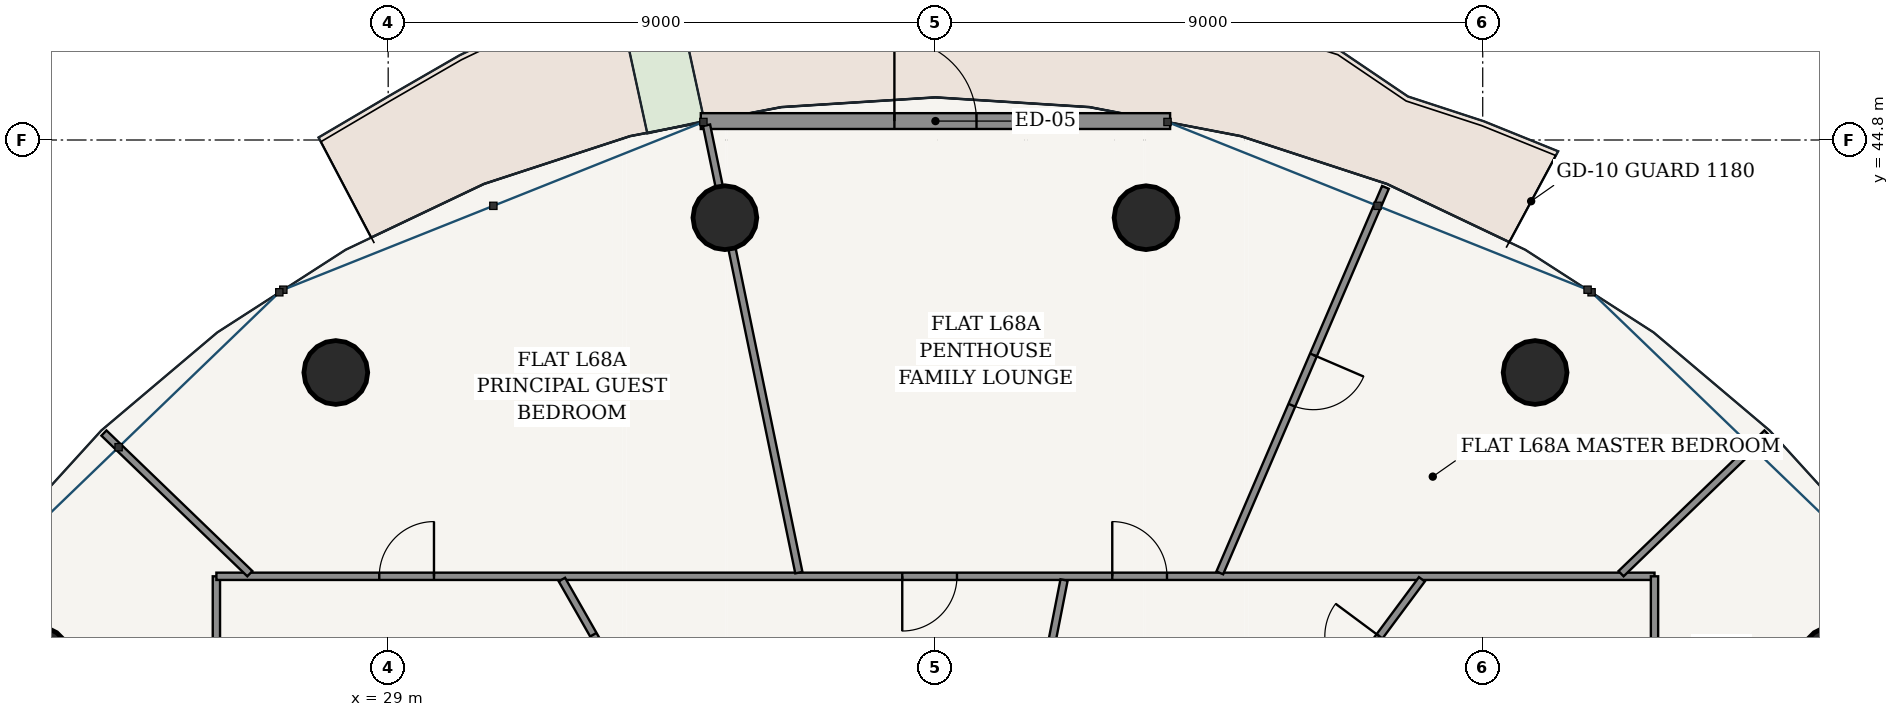
"""IFC4 building model, lengths in metres.
Left out: names, types, materials, properties, quantities, classifications, styles, units other than length and angle.
Written with IfcOpenShell. Run it as: python <this file> out.ifc"""

import sys

from ifc_helpers import new_model, si_unit, direction, frame, frame_2d, origin, origin_2d, place, context, subcontext, project, spatial, rectangle, hollow_circle, extrude, source, transform, mapped, element, fill, save


model = new_model("IFC4")
c1 = context("Model", 3, precision=1e-05, world=origin(), true_north=direction((-0.2419218956, 0.970295726276)))
c2 = subcontext(c1, "Body", "Model", "MODEL_VIEW")
j1 = project(units=[si_unit("LENGTHUNIT", "METRE"), si_unit("PLANEANGLEUNIT", "RADIAN")], contexts=[c1])
p1 = place(None, origin())
s1 = spatial("IfcSite", under=j1, at=p1, CompositionType="ELEMENT")
p2 = place(p1, origin())
s2 = spatial("IfcBuilding", under=s1, at=p2, CompositionType="ELEMENT")
p3 = place(p2, frame((0.0, 0.0, 259.45)))
s3 = spatial("IfcBuildingStorey", under=s2, at=p3, CompositionType="ELEMENT", Elevation=259.45)
for number, where, z_axis, x_axis in (
    (1, (52.759, 36.272, 0.0), (0.0, 0.0, 1.0), (1.0, 0.0, 0.0)),
    (2, (47.861, 40.977, 0.0), (0.0, 0.0, 1.0), (1.0, 0.0, 0.0)),
    (3, (41.463, 43.522, 0.0), (0.0, 0.0, 1.0), (1.0, 0.0, 0.0)),
    (4, (34.537, 43.522, 0.0), (0.0, 0.0, 1.0), (1.0, 0.0, 0.0)),
    (5, (28.139, 40.977, 0.0), (0.0, 0.0, 1.0), (1.0, 0.0, 0.0)),
    (6, (23.241, 36.272, 0.0), (0.0, 0.0, 1.0), (1.0, 0.0, 0.0)),
):
    element("IfcColumn", number, at=place(p3, frame(where, z_axis=z_axis, x_axis=x_axis)), inside=s3, PredefinedType="COLUMN", context=c2, shape_type="SweptSolid", body=[
        extrude(hollow_circle(Radius=0.525, WallThickness=0.035, at=origin_2d()), origin(), (0.0, 0.0, 1.0), 3.75),
    ])
p4 = place(p3, frame((41.859, 45.111, 0.0), z_axis=(0.0, 0.0, 1.0), x_axis=(-1.0, 0.0, 0.0)))
e7 = element("IfcWall", 7, at=p4, inside=s3, PredefinedType="SOLIDWALL", context=c2, shape_type="SweptSolid", body=[
    extrude(rectangle(XDim=7.718, YDim=0.26, at=frame_2d((3.859, 0.0))), origin(), (0.0, 0.0, 1.0), 3.49),
])
p5 = place(p4, frame((3.184, 0.0, 0.0)))
e8 = element("IfcOpeningElement", 8, at=p5, cuts=e7, PredefinedType="OPENING", context=c2, shape_type="SweptSolid", body=[
    extrude(rectangle(XDim=1.35, YDim=2.2, at=frame_2d((0.675, 1.1))), frame((0.0, 0.14, 0.0), z_axis=(0.0, -1.0, 0.0), x_axis=(1.0, 0.0, 0.0)), (0.0, 0.0, 1.0), 0.28),
])
p6 = place(p3, frame((26.175, 34.01, 0.0), z_axis=(0.0, 0.0, 1.0), x_axis=(0.0, 1.0, 0.0)))
e9 = element("IfcWall", 9, at=p6, inside=s3, PredefinedType="PARTITIONING", context=c2, shape_type="SweptSolid", body=[
    extrude(rectangle(XDim=3.615, YDim=0.12, at=frame_2d((1.808, 0.0))), origin(), (0.0, 0.0, 1.0), 3.015),
])
p7 = place(p6, frame((1.357, 0.0, 0.0)))
e10 = element("IfcOpeningElement", 10, at=p7, cuts=e9, PredefinedType="OPENING", context=c2, shape_type="SweptSolid", body=[
    extrude(rectangle(XDim=0.9, YDim=2.15, at=frame_2d((0.45, 1.075))), frame((0.0, 0.07, 0.0), z_axis=(0.0, -1.0, 0.0), x_axis=(1.0, 0.0, 0.0)), (0.0, 0.0, 1.0), 0.14),
])
p8 = place(p3, frame((26.175, 37.625, 0.0), z_axis=(0.0, 0.0, 1.0), x_axis=(1.0, 0.0, 0.0)))
e11 = element("IfcWall", 11, at=p8, inside=s3, PredefinedType="PARTITIONING", context=c2, shape_type="SweptSolid", body=[
    extrude(rectangle(XDim=23.65, YDim=0.12, at=frame_2d((11.825, 0.0))), origin(), (0.0, 0.0, 1.0), 3.015),
])
p9 = place(p8, frame((14.733, 0.0, 0.0)))
e12 = element("IfcOpeningElement", 12, at=p9, cuts=e11, PredefinedType="OPENING", context=c2, shape_type="SweptSolid", body=[
    extrude(rectangle(XDim=0.9, YDim=2.15, at=frame_2d((0.45, 1.075))), frame((0.0, 0.07, 0.0), z_axis=(0.0, -1.0, 0.0), x_axis=(1.0, 0.0, 0.0)), (0.0, 0.0, 1.0), 0.14),
])
p10 = place(p8, frame((11.279, 0.0, 0.0)))
e13 = element("IfcOpeningElement", 13, at=p10, cuts=e11, PredefinedType="OPENING", context=c2, shape_type="SweptSolid", body=[
    extrude(rectangle(XDim=0.9, YDim=2.15, at=frame_2d((0.45, 1.075))), frame((0.0, 0.07, 0.0), z_axis=(0.0, -1.0, 0.0), x_axis=(1.0, 0.0, 0.0)), (0.0, 0.0, 1.0), 0.14),
])
p11 = place(p8, frame((2.678, 0.0, 0.0)))
e14 = element("IfcOpeningElement", 14, at=p11, cuts=e11, PredefinedType="OPENING", context=c2, shape_type="SweptSolid", body=[
    extrude(rectangle(XDim=0.9, YDim=2.15, at=frame_2d((0.45, 1.075))), frame((0.0, 0.07, 0.0), z_axis=(0.0, -1.0, 0.0), x_axis=(1.0, 0.0, 0.0)), (0.0, 0.0, 1.0), 0.14),
])
p12 = place(p3, frame((49.825, 37.625, 0.0), z_axis=(0.0, 0.0, 1.0), x_axis=(0.0, -1.0, 0.0)))
e15 = element("IfcWall", 15, at=p12, inside=s3, PredefinedType="PARTITIONING", context=c2, shape_type="SweptSolid", body=[
    extrude(rectangle(XDim=3.615, YDim=0.12, at=frame_2d((1.808, 0.0))), origin(), (0.0, 0.0, 1.0), 3.015),
])
p13 = place(p12, frame((1.357, 0.0, 0.0)))
e16 = element("IfcOpeningElement", 16, at=p13, cuts=e15, PredefinedType="OPENING", context=c2, shape_type="SweptSolid", body=[
    extrude(rectangle(XDim=0.9, YDim=2.15, at=frame_2d((0.45, 1.075))), frame((0.0, 0.07, 0.0), z_axis=(0.0, -1.0, 0.0), x_axis=(1.0, 0.0, 0.0)), (0.0, 0.0, 1.0), 0.14),
])
p14 = place(p3, frame((49.275, 37.668, 0.0), z_axis=(0.0, 0.0, 1.0), x_axis=(0.719954096891, 0.694021684366, 0.0)))
e17 = element("IfcWall", 17, at=p14, inside=s3, PredefinedType="PARTITIONING", context=c2, shape_type="SweptSolid", body=[
    extrude(rectangle(XDim=3.333, YDim=0.12, at=frame_2d((1.667, 0.0))), origin(), (0.0, 0.0, 1.0), 3.121),
])
p15 = place(p3, frame((42.676, 37.682, 0.0), z_axis=(0.0, 0.0, 1.0), x_axis=(0.394777489933, 0.918776759307, 0.0)))
e18 = element("IfcWall", 18, at=p15, inside=s3, PredefinedType="PARTITIONING", context=c2, shape_type="SweptSolid", body=[
    extrude(rectangle(XDim=6.9, YDim=0.12, at=frame_2d((3.45, 0.0))), origin(), (0.0, 0.0, 1.0), 3.121),
])
p16 = place(p15, frame((3.0, 0.0, 0.0)))
e19 = element("IfcOpeningElement", 19, at=p16, cuts=e18, PredefinedType="OPENING", context=c2, shape_type="SweptSolid", body=[
    extrude(rectangle(XDim=0.9, YDim=2.15, at=frame_2d((0.45, 1.075))), frame((0.0, 0.07, 0.0), z_axis=(0.0, -1.0, 0.0), x_axis=(1.0, 0.0, 0.0)), (0.0, 0.0, 1.0), 0.14),
])
p17 = place(p3, frame((35.754, 37.686, 0.0), z_axis=(0.0, 0.0, 1.0), x_axis=(-0.202105877204, 0.979363678313, 0.0)))
e20 = element("IfcWall", 20, at=p17, inside=s3, PredefinedType="PARTITIONING", context=c2, shape_type="SweptSolid", body=[
    extrude(rectangle(XDim=7.512, YDim=0.12, at=frame_2d((3.756, 0.0))), origin(), (0.0, 0.0, 1.0), 3.015),
])
p18 = place(p3, frame((26.725, 37.668, 0.0), z_axis=(0.0, 0.0, 1.0), x_axis=(-0.719954096891, 0.694021684366, 0.0)))
e21 = element("IfcWall", 21, at=p18, inside=s3, PredefinedType="PARTITIONING", context=c2, shape_type="SweptSolid", body=[
    extrude(rectangle(XDim=3.333, YDim=0.12, at=frame_2d((1.667, 0.0))), origin(), (0.0, 0.0, 1.0), 3.121),
])
p19 = place(p3, frame((44.07, 34.977, 0.0), z_axis=(0.0, 0.0, 1.0), x_axis=(0.596033679783, 0.802959433947, 0.0)))
e22 = element("IfcWall", 22, at=p19, inside=s3, PredefinedType="PARTITIONING", context=c2, shape_type="SweptSolid", body=[
    extrude(rectangle(XDim=3.236, YDim=0.12, at=frame_2d((1.618, 0.0))), origin(), (0.0, 0.0, 1.0), 3.49),
])
p20 = place(p19, frame((1.168, 0.0, 0.0)))
e23 = element("IfcOpeningElement", 23, at=p20, cuts=e22, PredefinedType="OPENING", context=c2, shape_type="SweptSolid", body=[
    extrude(rectangle(XDim=0.9, YDim=2.15, at=frame_2d((0.45, 1.075))), frame((0.0, 0.07, 0.0), z_axis=(0.0, -1.0, 0.0), x_axis=(1.0, 0.0, 0.0)), (0.0, 0.0, 1.0), 0.14),
])
p21 = place(p3, frame((39.607, 34.977, 0.0), z_axis=(0.0, 0.0, 1.0), x_axis=(0.192785105701, 0.981241001497, 0.0)))
e24 = element("IfcWall", 24, at=p21, inside=s3, PredefinedType="PARTITIONING", context=c2, shape_type="SweptSolid", body=[
    extrude(rectangle(XDim=2.637, YDim=0.12, at=frame_2d((1.318, 0.0))), origin(), (0.0, 0.0, 1.0), 2.575),
])
p22 = place(p3, frame((33.336, 34.977, 0.0), z_axis=(0.0, 0.0, 1.0), x_axis=(-0.495399243909, 0.868665406894, 0.0)))
e25 = element("IfcWall", 25, at=p22, inside=s3, PredefinedType="PARTITIONING", context=c2, shape_type="SweptSolid", body=[
    extrude(rectangle(XDim=2.987, YDim=0.12, at=frame_2d((1.493, 0.0))), origin(), (0.0, 0.0, 1.0), 3.49),
])
p23 = place(p22, frame((1.043, 0.0, 0.0)))
e26 = element("IfcOpeningElement", 26, at=p23, cuts=e25, PredefinedType="OPENING", context=c2, shape_type="SweptSolid", body=[
    extrude(rectangle(XDim=0.9, YDim=2.15, at=frame_2d((0.45, 1.075))), frame((0.0, 0.07, 0.0), z_axis=(0.0, -1.0, 0.0), x_axis=(1.0, 0.0, 0.0)), (0.0, 0.0, 1.0), 0.14),
])
m1 = source(origin(), c2, "Body", "SweptSolid", [
    extrude(rectangle(XDim=1.35, YDim=2.2, at=frame_2d((0.675, 1.1))), frame((0.0, 0.025, 0.0), z_axis=(0.0, -1.0, 0.0), x_axis=(1.0, 0.0, 0.0)), (0.0, 0.0, 1.0), 0.05),
])
p24 = place(p5, frame((1.35, 0.0, 0.0), z_axis=(0.0, 0.0, 1.0), x_axis=(-1.0, 0.0, 0.0)))
e27 = element("IfcDoor", 27, at=p24, inside=s3, OperationType="SINGLE_SWING_LEFT", PredefinedType="DOOR", context=c2, shape_type="MappedRepresentation", body=[
    mapped(m1, transform((0.0, 0.0, 0.0), scale=1.0)),
])
fill(e8, e27)
m2 = source(origin(), c2, "Body", "SweptSolid", [
    extrude(rectangle(XDim=0.9, YDim=2.15, at=frame_2d((0.45, 1.075))), frame((0.0, 0.025, 0.0), z_axis=(0.0, -1.0, 0.0), x_axis=(1.0, 0.0, 0.0)), (0.0, 0.0, 1.0), 0.05),
])
p25 = place(p20, origin())
e28 = element("IfcDoor", 28, at=p25, inside=s3, OperationType="SINGLE_SWING_RIGHT", PredefinedType="DOOR", context=c2, shape_type="MappedRepresentation", body=[
    mapped(m2, transform((0.0, 0.0, 0.0), scale=1.0)),
])
fill(e23, e28)
p26 = place(p9, origin())
e29 = element("IfcDoor", 29, at=p26, inside=s3, OperationType="SINGLE_SWING_LEFT", PredefinedType="DOOR", context=c2, shape_type="MappedRepresentation", body=[
    mapped(m2, transform((0.0, 0.0, 0.0), scale=1.0)),
])
fill(e12, e29)
p27 = place(p10, frame((0.9, 0.0, 0.0), z_axis=(0.0, 0.0, 1.0), x_axis=(-1.0, 0.0, 0.0)))
e30 = element("IfcDoor", 30, at=p27, inside=s3, OperationType="SINGLE_SWING_RIGHT", PredefinedType="DOOR", context=c2, shape_type="MappedRepresentation", body=[
    mapped(m2, transform((0.0, 0.0, 0.0), scale=1.0)),
])
fill(e13, e30)
p28 = place(p23, origin())
e31 = element("IfcDoor", 31, at=p28, inside=s3, OperationType="SINGLE_SWING_LEFT", PredefinedType="DOOR", context=c2, shape_type="MappedRepresentation", body=[
    mapped(m2, transform((0.0, 0.0, 0.0), scale=1.0)),
])
fill(e26, e31)
p29 = place(p16, frame((0.9, 0.0, 0.0), z_axis=(0.0, 0.0, 1.0), x_axis=(-1.0, 0.0, 0.0)))
e32 = element("IfcDoor", 32, at=p29, inside=s3, OperationType="SINGLE_SWING_LEFT", PredefinedType="DOOR", context=c2, shape_type="MappedRepresentation", body=[
    mapped(m2, transform((0.0, 0.0, 0.0), scale=1.0)),
])
fill(e19, e32)
p30 = place(p11, origin())
e33 = element("IfcDoor", 33, at=p30, inside=s3, OperationType="SINGLE_SWING_RIGHT", PredefinedType="DOOR", context=c2, shape_type="MappedRepresentation", body=[
    mapped(m2, transform((0.0, 0.0, 0.0), scale=1.0)),
])
fill(e14, e33)
save(model, sys.argv[1])
